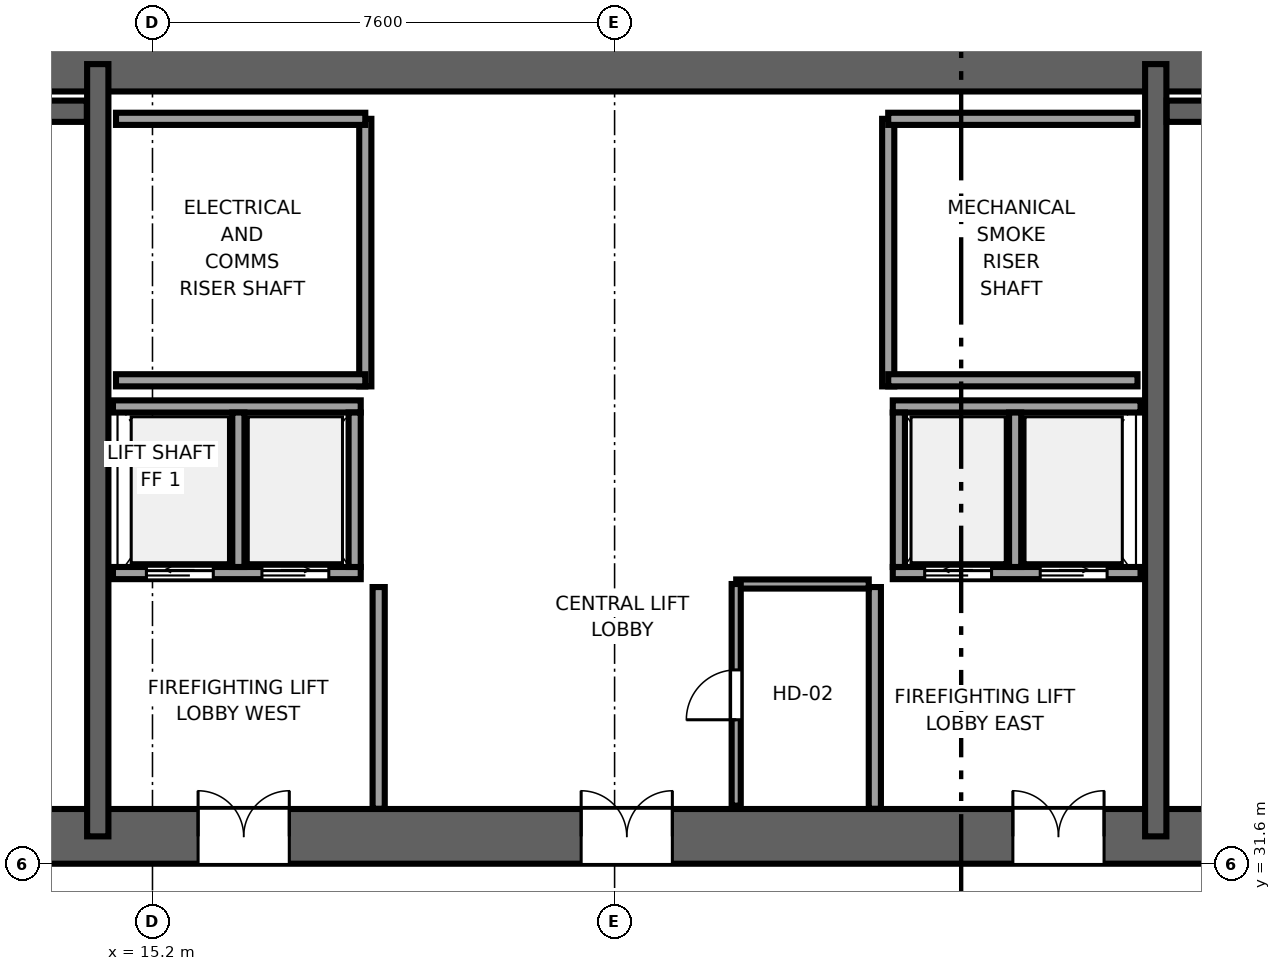
"""IFC4 building model, lengths in metres.
Left out: names, types, materials, properties, quantities, classifications, styles, units other than length and angle.
Written with IfcOpenShell. Run it as: python <this file> out.ifc"""

import sys

from ifc_helpers import new_model, si_unit, direction, frame, frame_2d, origin, place, context, subcontext, project, spatial, rectangle, extrude, source, transform, mapped, element, fill, save


model = new_model("IFC4")
c1 = context("Model", 3, precision=1e-05, world=origin(), true_north=direction((0.0, 1.0)))
c2 = subcontext(c1, "Body", "Model", "MODEL_VIEW")
j1 = project(units=[si_unit("LENGTHUNIT", "METRE"), si_unit("PLANEANGLEUNIT", "RADIAN")], contexts=[c1])
p1 = place(None, origin())
s1 = spatial("IfcSite", under=j1, at=p1, CompositionType="ELEMENT")
p2 = place(p1, origin())
s2 = spatial("IfcBuilding", under=s1, at=p2, CompositionType="ELEMENT")
p3 = place(p2, frame((0.0, 0.0, -14.4)))
s3 = spatial("IfcBuildingStorey", under=s2, at=p3, CompositionType="ELEMENT", Elevation=-14.4)
p4 = place(p3, frame((9.6, 32.05, 0.0), z_axis=(0.0, 0.0, 1.0), x_axis=(1.0, 0.0, 0.0)))
e1 = element("IfcWall", 1, at=p4, inside=s3, PredefinedType="SHEAR", context=c2, shape_type="SweptSolid", body=[
    extrude(rectangle(XDim=26.8, YDim=0.9, at=frame_2d((13.4, 0.0))), origin(), (0.0, 0.0, 1.0), 4.8),
])
p5 = place(p4, frame((7.85, 0.0, 0.0), z_axis=(0.0, 0.0, 1.0), x_axis=(-1.0, 0.0, 0.0)))
e2 = element("IfcOpeningElement", 2, at=p5, cuts=e1, PredefinedType="OPENING", context=c2, shape_type="SweptSolid", body=[
    extrude(rectangle(XDim=1.5, YDim=2.04, at=frame_2d((0.75, 1.02))), frame((0.0, 0.46, 0.0), z_axis=(0.0, -1.0, 0.0), x_axis=(1.0, 0.0, 0.0)), (0.0, 0.0, 1.0), 0.92),
])
p6 = place(p4, frame((14.15, 0.0, 0.0), z_axis=(0.0, 0.0, 1.0), x_axis=(-1.0, 0.0, 0.0)))
e3 = element("IfcOpeningElement", 3, at=p6, cuts=e1, PredefinedType="OPENING", context=c2, shape_type="SweptSolid", body=[
    extrude(rectangle(XDim=1.5, YDim=2.04, at=frame_2d((0.75, 1.02))), frame((0.0, 0.46, 0.0), z_axis=(0.0, -1.0, 0.0), x_axis=(1.0, 0.0, 0.0)), (0.0, 0.0, 1.0), 0.92),
])
p7 = place(p4, frame((21.25, 0.0, 0.0), z_axis=(0.0, 0.0, 1.0), x_axis=(-1.0, 0.0, 0.0)))
e4 = element("IfcOpeningElement", 4, at=p7, cuts=e1, PredefinedType="OPENING", context=c2, shape_type="SweptSolid", body=[
    extrude(rectangle(XDim=1.5, YDim=2.04, at=frame_2d((0.75, 1.02))), frame((0.0, 0.46, 0.0), z_axis=(0.0, -1.0, 0.0), x_axis=(1.0, 0.0, 0.0)), (0.0, 0.0, 1.0), 0.92),
])
p8 = place(p3, frame((9.6, 44.75, 0.0), z_axis=(0.0, 0.0, 1.0), x_axis=(1.0, 0.0, 0.0)))
e5 = element("IfcWall", 5, at=p8, inside=s3, PredefinedType="SHEAR", context=c2, shape_type="SweptSolid", body=[
    extrude(rectangle(XDim=26.8, YDim=0.9, at=frame_2d((13.4, 0.0))), origin(), (0.0, 0.0, 1.0), 4.8),
])
for number, where, z_axis, x_axis in (
    (6, (14.3, 32.05, 0.0), (0.0, 0.0, 1.0), (0.0, 1.0, 0.0)),
    (7, (31.7, 32.05, 0.0), (0.0, 0.0, 1.0), (0.0, 1.0, 0.0)),
):
    element("IfcWall", number, at=place(p3, frame(where, z_axis=z_axis, x_axis=x_axis)), inside=s3, PredefinedType="SHEAR", context=c2, shape_type="SweptSolid", body=[
        extrude(rectangle(XDim=12.7, YDim=0.35, at=frame_2d((6.35, 0.0))), origin(), (0.0, 0.0, 1.0), 4.8),
    ])
for number, where, z_axis, x_axis in (
    (8, (10.52, 43.975, 0.0), (0.0, 0.0, 1.0), (1.0, 0.0, 0.0)),
    (9, (31.88, 43.975, 0.0), (0.0, 0.0, 1.0), (1.0, 0.0, 0.0)),
):
    element("IfcWall", number, at=place(p3, frame(where, z_axis=z_axis, x_axis=x_axis)), inside=s3, PredefinedType="SHEAR", context=c2, shape_type="SweptSolid", body=[
        extrude(rectangle(XDim=3.6, YDim=0.35, at=frame_2d((1.8, 0.0))), origin(), (0.0, 0.0, 1.0), 4.8),
    ])
p9 = place(p3, frame((18.7, 39.45, 0.0), z_axis=(0.0, 0.0, 1.0), x_axis=(0.0, 1.0, 0.0)))
e10 = element("IfcWall", 10, at=p9, inside=s3, PredefinedType="SOLIDWALL", context=c2, shape_type="SweptSolid", body=[
    extrude(rectangle(XDim=4.4, YDim=0.2, at=frame_2d((2.2, 0.0))), origin(), (0.0, 0.0, 1.0), 4.54),
])
for number, where, z_axis, x_axis in (
    (11, (14.6, 39.55, 0.0), (0.0, 0.0, 1.0), (1.0, 0.0, 0.0)),
    (12, (14.6, 43.85, 0.0), (0.0, 0.0, 1.0), (1.0, 0.0, 0.0)),
):
    element("IfcWall", number, at=place(p3, frame(where, z_axis=z_axis, x_axis=x_axis)), inside=s3, PredefinedType="SOLIDWALL", context=c2, shape_type="SweptSolid", body=[
        extrude(rectangle(XDim=4.1, YDim=0.2, at=frame_2d((2.05, 0.0))), origin(), (0.0, 0.0, 1.0), 4.54),
    ])
p10 = place(p3, frame((27.3, 39.45, 0.0), z_axis=(0.0, 0.0, 1.0), x_axis=(0.0, 1.0, 0.0)))
e13 = element("IfcWall", 13, at=p10, inside=s3, PredefinedType="SOLIDWALL", context=c2, shape_type="SweptSolid", body=[
    extrude(rectangle(XDim=4.4, YDim=0.2, at=frame_2d((2.2, 0.0))), origin(), (0.0, 0.0, 1.0), 4.54),
])
for number, where, z_axis, x_axis in (
    (14, (27.3, 39.55, 0.0), (0.0, 0.0, 1.0), (1.0, 0.0, 0.0)),
    (15, (27.3, 43.85, 0.0), (0.0, 0.0, 1.0), (1.0, 0.0, 0.0)),
):
    element("IfcWall", number, at=place(p3, frame(where, z_axis=z_axis, x_axis=x_axis)), inside=s3, PredefinedType="SOLIDWALL", context=c2, shape_type="SweptSolid", body=[
        extrude(rectangle(XDim=4.1, YDim=0.2, at=frame_2d((2.05, 0.0))), origin(), (0.0, 0.0, 1.0), 4.54),
    ])
for number, where, z_axis, x_axis in (
    (16, (18.92, 32.504, 0.0), (0.0, 0.0, 1.0), (0.0, 1.0, 0.0)),
    (17, (27.08, 32.504, 0.0), (0.0, 0.0, 1.0), (0.0, 1.0, 0.0)),
):
    element("IfcWall", number, at=place(p3, frame(where, z_axis=z_axis, x_axis=x_axis)), inside=s3, PredefinedType="SOLIDWALL", context=c2, shape_type="SweptSolid", body=[
        extrude(rectangle(XDim=3.646, YDim=0.2, at=frame_2d((1.823, 0.0))), origin(), (0.0, 0.0, 1.0), 4.54),
    ])
p11 = place(p3, frame((27.375, 36.38, 0.0), z_axis=(0.0, 0.0, 1.0), x_axis=(1.0, 0.0, 0.0)))
e18 = element("IfcWall", 18, at=p11, inside=s3, PredefinedType="SOLIDWALL", context=c2, shape_type="SweptSolid", body=[
    extrude(rectangle(XDim=4.075, YDim=0.2, at=frame_2d((2.038, 0.0))), origin(), (0.0, 0.0, 1.0), 4.54),
])
p12 = place(p11, frame((0.525, 0.0, 0.0)))
e19 = element("IfcOpeningElement", 19, at=p12, cuts=e18, PredefinedType="OPENING", context=c2, shape_type="SweptSolid", body=[
    extrude(rectangle(XDim=1.1, YDim=2.12, at=frame_2d((0.55, 1.06))), frame((0.0, 0.11, 0.0), z_axis=(0.0, -1.0, 0.0), x_axis=(1.0, 0.0, 0.0)), (0.0, 0.0, 1.0), 0.22),
])
p13 = place(p11, frame((2.425, 0.0, 0.0)))
e20 = element("IfcOpeningElement", 20, at=p13, cuts=e18, PredefinedType="OPENING", context=c2, shape_type="SweptSolid", body=[
    extrude(rectangle(XDim=1.1, YDim=2.12, at=frame_2d((0.55, 1.06))), frame((0.0, 0.11, 0.0), z_axis=(0.0, -1.0, 0.0), x_axis=(1.0, 0.0, 0.0)), (0.0, 0.0, 1.0), 0.22),
])
p14 = place(p3, frame((27.375, 39.12, 0.0), z_axis=(0.0, 0.0, 1.0), x_axis=(1.0, 0.0, 0.0)))
e21 = element("IfcWall", 21, at=p14, inside=s3, PredefinedType="SOLIDWALL", context=c2, shape_type="SweptSolid", body=[
    extrude(rectangle(XDim=4.075, YDim=0.2, at=frame_2d((2.038, 0.0))), origin(), (0.0, 0.0, 1.0), 4.54),
])
for number, where, z_axis, x_axis in (
    (22, (27.475, 36.48, 0.0), (0.0, 0.0, 1.0), (0.0, 1.0, 0.0)),
    (23, (29.387, 36.48, 0.0), (0.0, 0.0, 1.0), (0.0, 1.0, 0.0)),
):
    element("IfcWall", number, at=place(p3, frame(where, z_axis=z_axis, x_axis=x_axis)), inside=s3, PredefinedType="SOLIDWALL", context=c2, shape_type="SweptSolid", body=[
        extrude(rectangle(XDim=2.54, YDim=0.2, at=frame_2d((1.27, 0.0))), origin(), (0.0, 0.0, 1.0), 4.54),
    ])
p15 = place(p3, frame((14.55, 36.38, 0.0), z_axis=(0.0, 0.0, 1.0), x_axis=(1.0, 0.0, 0.0)))
e24 = element("IfcWall", 24, at=p15, inside=s3, PredefinedType="SOLIDWALL", context=c2, shape_type="SweptSolid", body=[
    extrude(rectangle(XDim=4.075, YDim=0.2, at=frame_2d((2.038, 0.0))), origin(), (0.0, 0.0, 1.0), 4.54),
])
p16 = place(p15, frame((0.55, 0.0, 0.0)))
e25 = element("IfcOpeningElement", 25, at=p16, cuts=e24, PredefinedType="OPENING", context=c2, shape_type="SweptSolid", body=[
    extrude(rectangle(XDim=1.1, YDim=2.12, at=frame_2d((0.55, 1.06))), frame((0.0, 0.11, 0.0), z_axis=(0.0, -1.0, 0.0), x_axis=(1.0, 0.0, 0.0)), (0.0, 0.0, 1.0), 0.22),
])
p17 = place(p15, frame((2.45, 0.0, 0.0)))
e26 = element("IfcOpeningElement", 26, at=p17, cuts=e24, PredefinedType="OPENING", context=c2, shape_type="SweptSolid", body=[
    extrude(rectangle(XDim=1.1, YDim=2.12, at=frame_2d((0.55, 1.06))), frame((0.0, 0.11, 0.0), z_axis=(0.0, -1.0, 0.0), x_axis=(1.0, 0.0, 0.0)), (0.0, 0.0, 1.0), 0.22),
])
p18 = place(p3, frame((14.55, 39.12, 0.0), z_axis=(0.0, 0.0, 1.0), x_axis=(1.0, 0.0, 0.0)))
e27 = element("IfcWall", 27, at=p18, inside=s3, PredefinedType="SOLIDWALL", context=c2, shape_type="SweptSolid", body=[
    extrude(rectangle(XDim=4.075, YDim=0.2, at=frame_2d((2.038, 0.0))), origin(), (0.0, 0.0, 1.0), 4.54),
])
for number, where, z_axis, x_axis in (
    (28, (18.525, 36.48, 0.0), (0.0, 0.0, 1.0), (0.0, 1.0, 0.0)),
    (29, (16.613, 36.48, 0.0), (0.0, 0.0, 1.0), (0.0, 1.0, 0.0)),
):
    element("IfcWall", number, at=place(p3, frame(where, z_axis=z_axis, x_axis=x_axis)), inside=s3, PredefinedType="SOLIDWALL", context=c2, shape_type="SweptSolid", body=[
        extrude(rectangle(XDim=2.54, YDim=0.2, at=frame_2d((1.27, 0.0))), origin(), (0.0, 0.0, 1.0), 4.54),
    ])
p19 = place(p3, frame((24.8, 36.2, 0.0), z_axis=(0.0, 0.0, 1.0), x_axis=(1.0, 0.0, 0.0)))
e30 = element("IfcWall", 30, at=p19, inside=s3, PredefinedType="PARTITIONING", context=c2, shape_type="SweptSolid", body=[
    extrude(rectangle(XDim=2.18, YDim=0.15, at=frame_2d((1.09, 0.0))), origin(), (0.0, 0.0, 1.0), 4.54),
])
p20 = place(p3, frame((24.8, 32.555, 0.0), z_axis=(0.0, 0.0, 1.0), x_axis=(0.0, 1.0, 0.0)))
e31 = element("IfcWall", 31, at=p20, inside=s3, PredefinedType="PARTITIONING", context=c2, shape_type="SweptSolid", body=[
    extrude(rectangle(XDim=3.645, YDim=0.15, at=frame_2d((1.823, 0.0))), origin(), (0.0, 0.0, 1.0), 4.54),
])
p21 = place(p20, frame((1.413, 0.0, 0.0)))
e32 = element("IfcOpeningElement", 32, at=p21, cuts=e31, PredefinedType="OPENING", context=c2, shape_type="SweptSolid", body=[
    extrude(rectangle(XDim=0.82, YDim=2.01, at=frame_2d((0.41, 1.005))), frame((0.0, 0.085, 0.0), z_axis=(0.0, -1.0, 0.0), x_axis=(1.0, 0.0, 0.0)), (0.0, 0.0, 1.0), 0.17),
])
m1 = source(origin(), c2, "Body", "SweptSolid", [
    extrude(rectangle(XDim=1.5, YDim=2.04, at=frame_2d((0.75, 1.02))), frame((0.0, 0.025, 0.0), z_axis=(0.0, -1.0, 0.0), x_axis=(1.0, 0.0, 0.0)), (0.0, 0.0, 1.0), 0.05),
])
p22 = place(p5, origin())
e33 = element("IfcDoor", 33, at=p22, inside=s3, OperationType="DOUBLE_DOOR_SINGLE_SWING", PredefinedType="DOOR", context=c2, shape_type="MappedRepresentation", body=[
    mapped(m1, transform((0.0, 0.0, 0.0), x_axis=(1.0, 0.0, 0.0), y_axis=(0.0, 1.0, 0.0), z_axis=(0.0, 0.0, 1.0), scale=1.0)),
])
fill(e2, e33)
p23 = place(p6, origin())
e34 = element("IfcDoor", 34, at=p23, inside=s3, OperationType="DOUBLE_DOOR_SINGLE_SWING", PredefinedType="DOOR", context=c2, shape_type="MappedRepresentation", body=[
    mapped(m1, transform((0.0, 0.0, 0.0), x_axis=(1.0, 0.0, 0.0), y_axis=(0.0, 1.0, 0.0), z_axis=(0.0, 0.0, 1.0), scale=1.0)),
])
fill(e3, e34)
p24 = place(p7, origin())
e35 = element("IfcDoor", 35, at=p24, inside=s3, OperationType="DOUBLE_DOOR_SINGLE_SWING", PredefinedType="DOOR", context=c2, shape_type="MappedRepresentation", body=[
    mapped(m1, transform((0.0, 0.0, 0.0), x_axis=(1.0, 0.0, 0.0), y_axis=(0.0, 1.0, 0.0), z_axis=(0.0, 0.0, 1.0), scale=1.0)),
])
fill(e4, e35)
m2 = source(origin(), c2, "Body", "SweptSolid", [
    extrude(rectangle(XDim=1.1, YDim=2.12, at=frame_2d((0.55, 1.06))), frame((0.0, 0.025, 0.0), z_axis=(0.0, -1.0, 0.0), x_axis=(1.0, 0.0, 0.0)), (0.0, 0.0, 1.0), 0.05),
])
p25 = place(p12, origin())
e36 = element("IfcDoor", 36, at=p25, inside=s3, OperationType="SLIDING_TO_LEFT", PredefinedType="DOOR", context=c2, shape_type="MappedRepresentation", body=[
    mapped(m2, transform((0.0, 0.0, 0.0), x_axis=(1.0, 0.0, 0.0), y_axis=(0.0, 1.0, 0.0), z_axis=(0.0, 0.0, 1.0), scale=1.0)),
])
fill(e19, e36)
p26 = place(p13, origin())
e37 = element("IfcDoor", 37, at=p26, inside=s3, OperationType="SLIDING_TO_RIGHT", PredefinedType="DOOR", context=c2, shape_type="MappedRepresentation", body=[
    mapped(m2, transform((0.0, 0.0, 0.0), x_axis=(1.0, 0.0, 0.0), y_axis=(0.0, 1.0, 0.0), z_axis=(0.0, 0.0, 1.0), scale=1.0)),
])
fill(e20, e37)
p27 = place(p16, origin())
e38 = element("IfcDoor", 38, at=p27, inside=s3, OperationType="SLIDING_TO_LEFT", PredefinedType="DOOR", context=c2, shape_type="MappedRepresentation", body=[
    mapped(m2, transform((0.0, 0.0, 0.0), x_axis=(1.0, 0.0, 0.0), y_axis=(0.0, 1.0, 0.0), z_axis=(0.0, 0.0, 1.0), scale=1.0)),
])
fill(e25, e38)
p28 = place(p17, origin())
e39 = element("IfcDoor", 39, at=p28, inside=s3, OperationType="SLIDING_TO_RIGHT", PredefinedType="DOOR", context=c2, shape_type="MappedRepresentation", body=[
    mapped(m2, transform((0.0, 0.0, 0.0), x_axis=(1.0, 0.0, 0.0), y_axis=(0.0, 1.0, 0.0), z_axis=(0.0, 0.0, 1.0), scale=1.0)),
])
fill(e26, e39)
m3 = source(origin(), c2, "Body", "SweptSolid", [
    extrude(rectangle(XDim=0.82, YDim=2.01, at=frame_2d((0.41, 1.005))), frame((0.0, 0.025, 0.0), z_axis=(0.0, -1.0, 0.0), x_axis=(1.0, 0.0, 0.0)), (0.0, 0.0, 1.0), 0.05),
])
p29 = place(p21, origin())
e40 = element("IfcDoor", 40, at=p29, inside=s3, OperationType="SINGLE_SWING_LEFT", PredefinedType="DOOR", context=c2, shape_type="MappedRepresentation", body=[
    mapped(m3, transform((0.0, 0.0, 0.0), x_axis=(1.0, 0.0, 0.0), y_axis=(0.0, 1.0, 0.0), z_axis=(0.0, 0.0, 1.0), scale=1.0)),
])
fill(e32, e40)
save(model, sys.argv[1])
